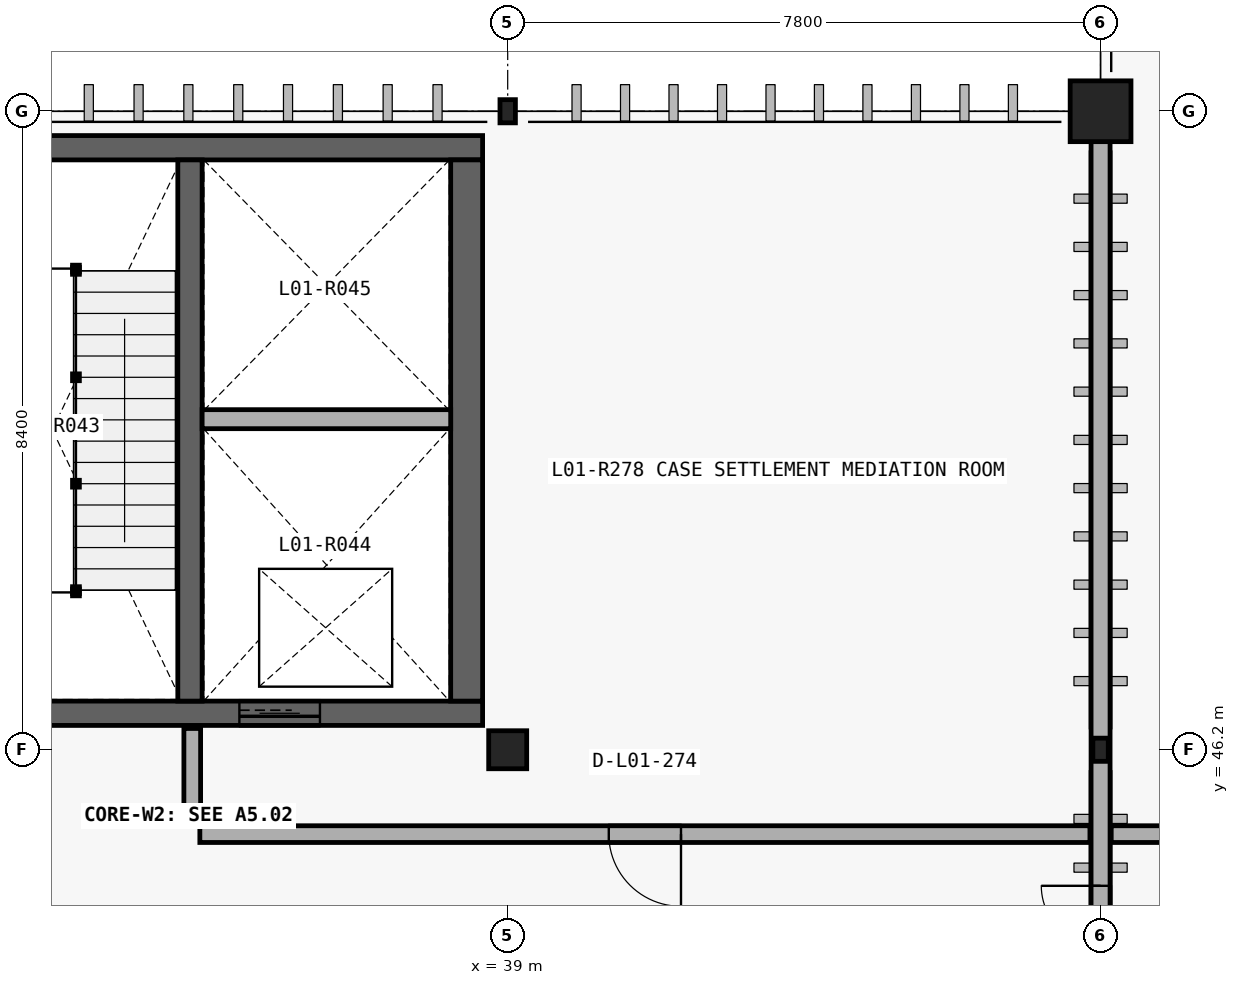
"""IFC4 building model, lengths in metres.
Left out: names, types, materials, properties, quantities, classifications, styles, units other than length and angle.
Written with IfcOpenShell. Run it as: python <this file> out.ifc"""

import sys

from ifc_helpers import new_model, si_unit, direction, frame, frame_2d, origin_with_axes, origin_2d_with_axis, place, context, subcontext, project, spatial, rectangle, hollow_rectangle, circle, i_section, extrude, element, fill, save


model = new_model("IFC4")
c1 = context("Model", 3, precision=1e-05, world=origin_with_axes(), true_north=direction((0.0, 1.0)))
c2 = subcontext(c1, "Body", "Model", "MODEL_VIEW")
j1 = project(units=[si_unit("LENGTHUNIT", "METRE"), si_unit("PLANEANGLEUNIT", "RADIAN")], contexts=[c1])
p1 = place(None, origin_with_axes())
s1 = spatial("IfcSite", under=j1, at=p1, CompositionType="ELEMENT")
p2 = place(p1, origin_with_axes())
s2 = spatial("IfcBuilding", under=s1, at=p2, CompositionType="ELEMENT")
p3 = place(p2, frame((0.0, 0.0, 5.4), z_axis=(0.0, 0.0, 1.0), x_axis=(1.0, 0.0, 0.0)))
s3 = spatial("IfcBuildingStorey", under=s2, at=p3, CompositionType="ELEMENT", Elevation=5.4)
p4 = place(None, frame((30.93, 46.68, 5.4), z_axis=(0.0, 0.0, 1.0), x_axis=(1.0, 0.0, 0.0)))
e1 = element("IfcWall", 1, at=p4, inside=s3, PredefinedType="SHEAR", context=c2, shape_type="SweptSolid", body=[
    extrude(rectangle(XDim=7.74, YDim=0.32, at=frame_2d((3.87, 0.0), x_axis=(1.0, 0.0))), origin_with_axes(), (0.0, 0.0, 1.0), 5.4),
])
p5 = place(None, frame((32.35, 46.68, 5.4), z_axis=(0.0, 0.0, 1.0), x_axis=(1.0, 0.0, 0.0)))
e2 = element("IfcOpeningElement", 2, at=p5, cuts=e1, PredefinedType="OPENING", context=c2, shape_type="SweptSolid", body=[
    extrude(rectangle(XDim=1.14, YDim=2.18, at=frame_2d((0.0, 1.09), x_axis=(1.0, 0.0))), frame((0.0, 0.17, 0.0), z_axis=(0.0, -1.0, 0.0), x_axis=(1.0, 0.0, 0.0)), (0.0, 0.0, 1.0), 0.34),
])
p6 = place(None, frame((36.0, 46.68, 5.4), z_axis=(0.0, 0.0, 1.0), x_axis=(1.0, 0.0, 0.0)))
e3 = element("IfcOpeningElement", 3, at=p6, cuts=e1, PredefinedType="OPENING", context=c2, shape_type="SweptSolid", body=[
    extrude(rectangle(XDim=1.06, YDim=2.16, at=frame_2d((0.0, 1.08), x_axis=(1.0, 0.0))), frame((0.0, 0.17, 0.0), z_axis=(0.0, -1.0, 0.0), x_axis=(1.0, 0.0, 0.0)), (0.0, 0.0, 1.0), 0.34),
])
p7 = place(None, frame((38.67, 54.12, 5.4), z_axis=(0.0, 0.0, 1.0), x_axis=(-1.0, 0.0, 0.0)))
e4 = element("IfcWall", 4, at=p7, inside=s3, PredefinedType="SHEAR", context=c2, shape_type="SweptSolid", body=[
    extrude(rectangle(XDim=7.74, YDim=0.32, at=frame_2d((3.87, 0.0), x_axis=(1.0, 0.0))), origin_with_axes(), (0.0, 0.0, 1.0), 5.4),
])
p8 = place(None, frame((38.46, 46.84, 5.4), z_axis=(0.0, 0.0, 1.0), x_axis=(0.0, 1.0, 0.0)))
e5 = element("IfcWall", 5, at=p8, inside=s3, PredefinedType="SHEAR", context=c2, shape_type="SweptSolid", body=[
    extrude(rectangle(XDim=7.12, YDim=0.42, at=frame_2d((3.56, 0.0), x_axis=(1.0, 0.0))), origin_with_axes(), (0.0, 0.0, 1.0), 5.4),
])
p9 = place(None, frame((34.82, 46.84, 5.4), z_axis=(0.0, 0.0, 1.0), x_axis=(0.0, 1.0, 0.0)))
e6 = element("IfcWall", 6, at=p9, inside=s3, PredefinedType="SHEAR", context=c2, shape_type="SweptSolid", body=[
    extrude(rectangle(XDim=7.12, YDim=0.32, at=frame_2d((3.56, 0.0), x_axis=(1.0, 0.0))), origin_with_axes(), (0.0, 0.0, 1.0), 5.4),
])
p10 = place(None, frame((34.98, 50.549, 5.4), z_axis=(0.0, 0.0, 1.0), x_axis=(1.0, 0.0, 0.0)))
e7 = element("IfcWall", 7, at=p10, inside=s3, PredefinedType="PARTITIONING", context=c2, shape_type="SweptSolid", body=[
    extrude(rectangle(XDim=3.27, YDim=0.25, at=frame_2d((1.635, 0.0), x_axis=(1.0, 0.0))), origin_with_axes(), (0.0, 0.0, 1.0), 5.08),
])
p11 = place(None, frame((46.8, 39.05, 5.4), z_axis=(0.0, 0.0, 1.0), x_axis=(0.0, 1.0, 0.0)))
e8 = element("IfcWall", 8, at=p11, inside=s3, PredefinedType="PARTITIONING", context=c2, shape_type="SweptSolid", body=[
    extrude(rectangle(XDim=15.5, YDim=0.25, at=frame_2d((7.75, 0.0), x_axis=(1.0, 0.0))), origin_with_axes(), (0.0, 0.0, 1.0), 4.644),
])
p12 = place(None, frame((46.8, 43.63, 5.4), z_axis=(0.0, 0.0, 1.0), x_axis=(0.0, 1.0, 0.0)))
e9 = element("IfcOpeningElement", 9, at=p12, cuts=e8, PredefinedType="OPENING", context=c2, shape_type="SweptSolid", body=[
    extrude(rectangle(XDim=1.56, YDim=2.28, at=frame_2d((0.0, 1.14), x_axis=(1.0, 0.0))), frame((0.0, 0.135, 0.0), z_axis=(0.0, -1.0, 0.0), x_axis=(1.0, 0.0, 0.0)), (0.0, 0.0, 1.0), 0.27),
])
p13 = place(None, frame((34.85, 45.22, 5.4), z_axis=(0.0, 0.0, 1.0), x_axis=(0.0, 1.0, 0.0)))
e10 = element("IfcWall", 10, at=p13, inside=s3, PredefinedType="PARTITIONING", context=c2, shape_type="SweptSolid", body=[
    extrude(rectangle(XDim=1.26, YDim=0.22, at=frame_2d((0.63, 0.0), x_axis=(1.0, 0.0))), origin_with_axes(), (0.0, 0.0, 1.0), 5.08),
])
p14 = place(None, frame((34.95, 45.09, 5.4), z_axis=(0.0, 0.0, 1.0), x_axis=(1.0, 0.0, 0.0)))
e11 = element("IfcWall", 11, at=p14, inside=s3, PredefinedType="PARTITIONING", context=c2, shape_type="SweptSolid", body=[
    extrude(rectangle(XDim=11.71, YDim=0.22, at=frame_2d((5.855, 0.0), x_axis=(1.0, 0.0))), origin_with_axes(), (0.0, 0.0, 1.0), 5.08),
])
p15 = place(None, frame((40.805, 45.09, 5.4), z_axis=(0.0, 0.0, 1.0), x_axis=(1.0, 0.0, 0.0)))
e12 = element("IfcOpeningElement", 12, at=p15, cuts=e11, PredefinedType="OPENING", context=c2, shape_type="SweptSolid", body=[
    extrude(rectangle(XDim=0.95, YDim=2.16, at=frame_2d((0.0, 1.08), x_axis=(1.0, 0.0))), frame((0.0, 0.12, 0.0), z_axis=(0.0, -1.0, 0.0), x_axis=(1.0, 0.0, 0.0)), (0.0, 0.0, 1.0), 0.24),
])
p16 = place(None, frame((46.94, 45.09, 5.4), z_axis=(0.0, 0.0, 1.0), x_axis=(1.0, 0.0, 0.0)))
e13 = element("IfcWall", 13, at=p16, inside=s3, PredefinedType="PARTITIONING", context=c2, shape_type="SweptSolid", body=[
    extrude(rectangle(XDim=8.76, YDim=0.22, at=frame_2d((4.38, 0.0), x_axis=(1.0, 0.0))), origin_with_axes(), (0.0, 0.0, 1.0), 5.08),
])
p17 = place(None, frame((51.32, 45.09, 5.4), z_axis=(0.0, 0.0, 1.0), x_axis=(1.0, 0.0, 0.0)))
e14 = element("IfcOpeningElement", 14, at=p17, cuts=e13, PredefinedType="OPENING", context=c2, shape_type="SweptSolid", body=[
    extrude(rectangle(XDim=0.95, YDim=2.16, at=frame_2d((0.0, 1.08), x_axis=(1.0, 0.0))), frame((0.0, 0.12, 0.0), z_axis=(0.0, -1.0, 0.0), x_axis=(1.0, 0.0, 0.0)), (0.0, 0.0, 1.0), 0.24),
])
p18 = place(None, frame((39.0, 46.2, 5.4), z_axis=(0.0, 0.0, 1.0), x_axis=(1.0, 0.0, 0.0)))
e15 = element("IfcColumn", 15, at=p18, inside=s3, PredefinedType="COLUMN", context=c2, shape_type="SweptSolid", body=[
    extrude(i_section(OverallWidth=0.5, OverallDepth=0.5, WebThickness=0.022, FlangeThickness=0.036, at=origin_2d_with_axis()), origin_with_axes(), (0.0, 0.0, 1.0), 5.4),
])
for number, where, z_axis, x_axis in (
    (16, (39.0, 54.6, 5.4), (0.0, 0.0, 1.0), (1.0, 0.0, 0.0)),
    (17, (46.8, 46.2, 5.4), (0.0, 0.0, 1.0), (1.0, 0.0, 0.0)),
):
    element("IfcColumn", number, at=place(None, frame(where, z_axis=z_axis, x_axis=x_axis)), inside=s3, PredefinedType="COLUMN", context=c2, shape_type="SweptSolid", body=[
        extrude(hollow_rectangle(XDim=0.203, YDim=0.305, WallThickness=0.013, InnerFilletRadius=0.025, OuterFilletRadius=0.013, at=origin_2d_with_axis()), origin_with_axes(), (0.0, 0.0, 1.0), 5.4),
    ])
p19 = place(None, frame((46.8, 54.6, 5.4), z_axis=(0.0, 0.0, 1.0), x_axis=(1.0, 0.0, 0.0)))
e18 = element("IfcColumn", 18, at=p19, inside=s3, PredefinedType="COLUMN", context=c2, shape_type="SweptSolid", body=[
    extrude(circle(Radius=0.4, at=origin_2d_with_axis()), origin_with_axes(), (0.0, 0.0, 1.0), 5.4),
])
p20 = place(None, frame((36.0, 46.68, 5.4), z_axis=(0.0, 0.0, 1.0), x_axis=(-1.0, 0.0, 0.0)))
e19 = element("IfcDoor", 19, at=p20, inside=s3, OperationType="SLIDING_TO_LEFT", PredefinedType="DOOR", context=c2, shape_type="SweptSolid", body=[
    extrude(rectangle(XDim=1.06, YDim=2.16, at=frame_2d((0.0, 1.08), x_axis=(1.0, 0.0))), frame((0.0, 0.04, 0.0), z_axis=(0.0, -1.0, 0.0), x_axis=(1.0, 0.0, 0.0)), (0.0, 0.0, 1.0), 0.08),
])
fill(e3, e19)
p21 = place(None, frame((46.8, 43.63, 5.4), z_axis=(0.0, 0.0, 1.0), x_axis=(0.0, 1.0, 0.0)))
e20 = element("IfcDoor", 20, at=p21, inside=s3, OperationType="DOUBLE_DOOR_SINGLE_SWING", PredefinedType="DOOR", context=c2, shape_type="SweptSolid", body=[
    extrude(rectangle(XDim=1.56, YDim=2.28, at=frame_2d((0.0, 1.14), x_axis=(1.0, 0.0))), frame((0.0, 0.04, 0.0), z_axis=(0.0, -1.0, 0.0), x_axis=(1.0, 0.0, 0.0)), (0.0, 0.0, 1.0), 0.08),
])
fill(e9, e20)
p22 = place(None, frame((40.805, 45.09, 5.4), z_axis=(0.0, 0.0, 1.0), x_axis=(-1.0, 0.0, 0.0)))
e21 = element("IfcDoor", 21, at=p22, inside=s3, OperationType="SINGLE_SWING_RIGHT", PredefinedType="DOOR", context=c2, shape_type="SweptSolid", body=[
    extrude(rectangle(XDim=0.95, YDim=2.16, at=frame_2d((0.0, 1.08), x_axis=(1.0, 0.0))), frame((0.0, 0.04, 0.0), z_axis=(0.0, -1.0, 0.0), x_axis=(1.0, 0.0, 0.0)), (0.0, 0.0, 1.0), 0.08),
])
fill(e12, e21)
save(model, sys.argv[1])
